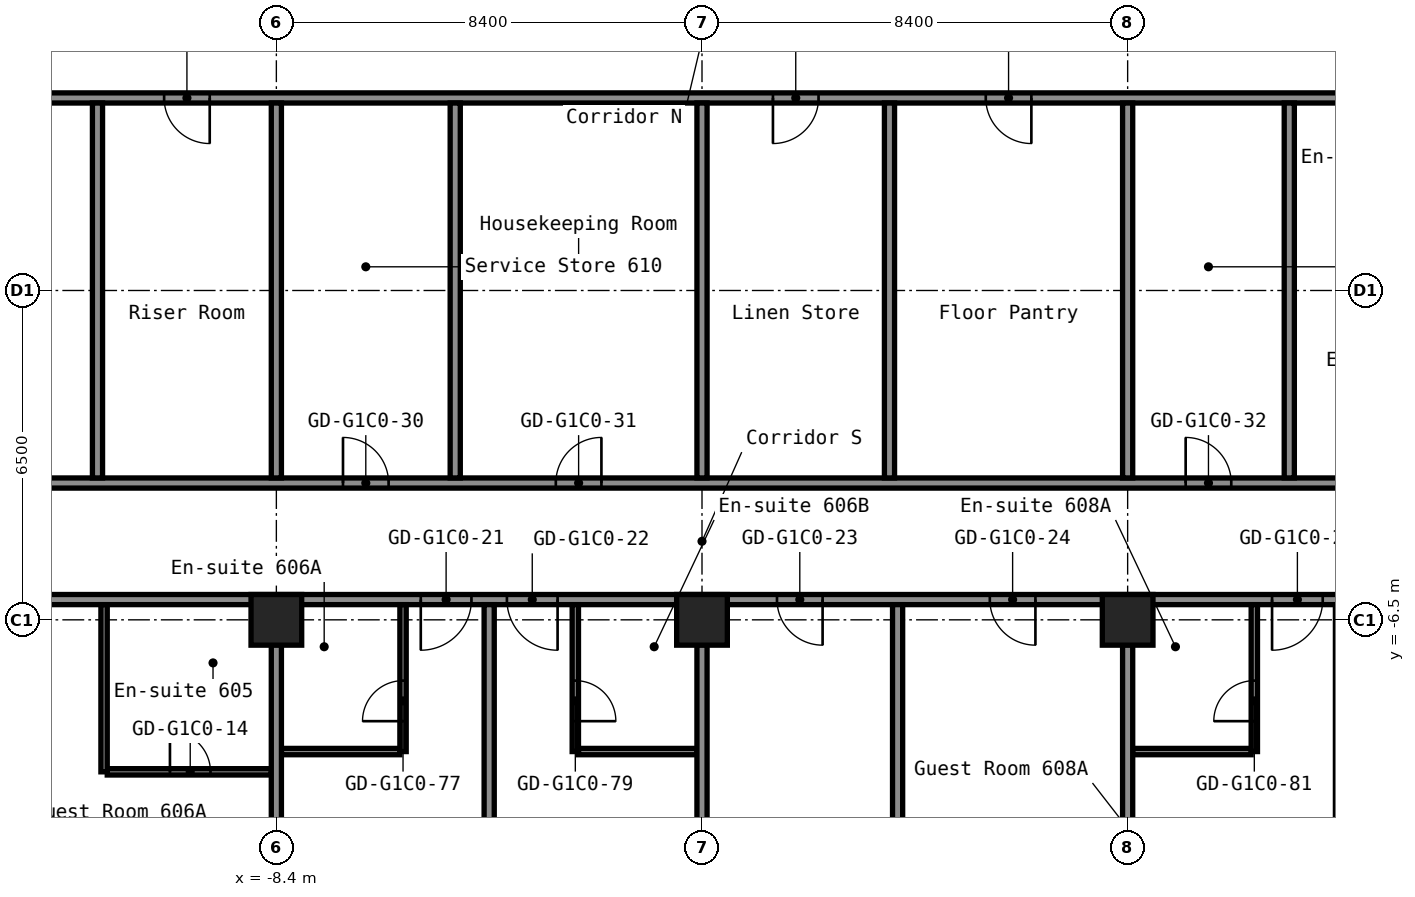
"""IFC4 building model, lengths in metres.
Left out: names, types, materials, properties, quantities, classifications, styles, units other than length and angle.
Written with IfcOpenShell. Run it as: python <this file> out.ifc"""

import sys

from ifc_helpers import new_model, si_unit, direction, frame, frame_2d, origin, origin_2d, place, context, subcontext, project, spatial, rectangle, hollow_rectangle, extrude, element, fill, save


model = new_model("IFC4")
c1 = context("Model", 3, precision=1e-05, world=origin(), true_north=direction((0.0, 1.0)))
c2 = subcontext(c1, "Body", "Model", "MODEL_VIEW")
j1 = project(units=[si_unit("LENGTHUNIT", "METRE"), si_unit("PLANEANGLEUNIT", "RADIAN")], contexts=[c1])
p1 = place(None, origin())
s1 = spatial("IfcSite", under=j1, at=p1, CompositionType="ELEMENT")
p2 = place(p1, origin())
s2 = spatial("IfcBuilding", under=s1, at=p2, CompositionType="ELEMENT")
p3 = place(p2, frame((0.0, 0.0, 26.2)))
s3 = spatial("IfcBuildingStorey", under=s2, at=p3, CompositionType="ELEMENT", Elevation=26.2)
for number, where, z_axis, x_axis in (
    (1, (-8.4, -6.5, 0.0), (0.0, 0.0, 1.0), (1.0, 0.0, 0.0)),
    (2, (0.0, -6.5, 0.0), (0.0, 0.0, 1.0), (1.0, 0.0, 0.0)),
    (3, (8.4, -6.5, 0.0), (0.0, 0.0, 1.0), (1.0, 0.0, 0.0)),
):
    element("IfcColumn", number, at=place(p3, frame(where, z_axis=z_axis, x_axis=x_axis)), inside=s3, PredefinedType="COLUMN", context=c2, shape_type="SweptSolid", body=[
        extrude(hollow_rectangle(XDim=1.0, YDim=1.0, WallThickness=0.04, at=origin_2d()), origin(), (0.0, 0.0, 1.0), 2.8),
    ])
p4 = place(p3, frame((-11.738, -9.5, 0.0), z_axis=(0.0, 0.0, 1.0), x_axis=(1.0, 0.0, 0.0)))
e4 = element("IfcWall", 4, at=p4, inside=s3, PredefinedType="PARTITIONING", context=c2, shape_type="SweptSolid", body=[
    extrude(rectangle(XDim=3.238, YDim=0.125, at=frame_2d((1.619, 0.0))), origin(), (0.0, 0.0, 1.0), 2.8),
])
p5 = place(p4, frame((1.238, 0.0, 0.0)))
e5 = element("IfcOpeningElement", 5, at=p5, cuts=e4, PredefinedType="OPENING", context=c2, shape_type="SweptSolid", body=[
    extrude(rectangle(XDim=0.8, YDim=2.1, at=frame_2d((0.4, 1.05))), frame((0.0, 0.073, 0.0), z_axis=(0.0, -1.0, 0.0), x_axis=(1.0, 0.0, 0.0)), (0.0, 0.0, 1.0), 0.145),
])
p6 = place(p3, frame((-8.3, -9.1, 0.0), z_axis=(0.0, 0.0, 1.0), x_axis=(1.0, 0.0, 0.0)))
e6 = element("IfcWall", 6, at=p6, inside=s3, PredefinedType="PARTITIONING", context=c2, shape_type="SweptSolid", body=[
    extrude(rectangle(XDim=2.338, YDim=0.125, at=frame_2d((1.169, 0.0))), origin(), (0.0, 0.0, 1.0), 2.8),
])
for number, where, z_axis, x_axis in (
    (7, (-2.438, -9.1, 0.0), (0.0, 0.0, 1.0), (1.0, 0.0, 0.0)),
    (8, (8.5, -9.1, 0.0), (0.0, 0.0, 1.0), (1.0, 0.0, 0.0)),
):
    element("IfcWall", number, at=place(p3, frame(where, z_axis=z_axis, x_axis=x_axis)), inside=s3, PredefinedType="PARTITIONING", context=c2, shape_type="SweptSolid", body=[
        extrude(rectangle(XDim=2.337, YDim=0.125, at=frame_2d((1.169, 0.0))), origin(), (0.0, 0.0, 1.0), 2.8),
    ])
p7 = place(p3, frame((-16.8, -6.1, 0.0), z_axis=(0.0, 0.0, 1.0), x_axis=(1.0, 0.0, 0.0)))
e9 = element("IfcWall", 9, at=p7, inside=s3, PredefinedType="PARTITIONING", context=c2, shape_type="SweptSolid", body=[
    extrude(rectangle(XDim=33.6, YDim=0.2, at=frame_2d((16.8, 0.0))), origin(), (0.0, 0.0, 1.0), 2.8),
])
p8 = place(p7, frame((2.0, 0.0, 0.0)))
e10 = element("IfcOpeningElement", 10, at=p8, cuts=e9, PredefinedType="OPENING", context=c2, shape_type="SweptSolid", body=[
    extrude(rectangle(XDim=1.0, YDim=2.1, at=frame_2d((0.5, 1.05))), frame((0.0, 0.11, 0.0), z_axis=(0.0, -1.0, 0.0), x_axis=(1.0, 0.0, 0.0)), (0.0, 0.0, 1.0), 0.22),
])
p9 = place(p7, frame((11.25, 0.0, 0.0)))
e11 = element("IfcOpeningElement", 11, at=p9, cuts=e9, PredefinedType="OPENING", context=c2, shape_type="SweptSolid", body=[
    extrude(rectangle(XDim=1.0, YDim=2.1, at=frame_2d((0.5, 1.05))), frame((0.0, 0.11, 0.0), z_axis=(0.0, -1.0, 0.0), x_axis=(1.0, 0.0, 0.0)), (0.0, 0.0, 1.0), 0.22),
])
p10 = place(p7, frame((12.95, 0.0, 0.0)))
e12 = element("IfcOpeningElement", 12, at=p10, cuts=e9, PredefinedType="OPENING", context=c2, shape_type="SweptSolid", body=[
    extrude(rectangle(XDim=1.0, YDim=2.1, at=frame_2d((0.5, 1.05))), frame((0.0, 0.11, 0.0), z_axis=(0.0, -1.0, 0.0), x_axis=(1.0, 0.0, 0.0)), (0.0, 0.0, 1.0), 0.22),
])
p11 = place(p7, frame((18.28, 0.0, 0.0)))
e13 = element("IfcOpeningElement", 13, at=p11, cuts=e9, PredefinedType="OPENING", context=c2, shape_type="SweptSolid", body=[
    extrude(rectangle(XDim=0.9, YDim=2.1, at=frame_2d((0.45, 1.05))), frame((0.0, 0.11, 0.0), z_axis=(0.0, -1.0, 0.0), x_axis=(1.0, 0.0, 0.0)), (0.0, 0.0, 1.0), 0.22),
])
p12 = place(p7, frame((22.48, 0.0, 0.0)))
e14 = element("IfcOpeningElement", 14, at=p12, cuts=e9, PredefinedType="OPENING", context=c2, shape_type="SweptSolid", body=[
    extrude(rectangle(XDim=0.9, YDim=2.1, at=frame_2d((0.45, 1.05))), frame((0.0, 0.11, 0.0), z_axis=(0.0, -1.0, 0.0), x_axis=(1.0, 0.0, 0.0)), (0.0, 0.0, 1.0), 0.22),
])
p13 = place(p7, frame((28.05, 0.0, 0.0)))
e15 = element("IfcOpeningElement", 15, at=p13, cuts=e9, PredefinedType="OPENING", context=c2, shape_type="SweptSolid", body=[
    extrude(rectangle(XDim=1.0, YDim=2.1, at=frame_2d((0.5, 1.05))), frame((0.0, 0.11, 0.0), z_axis=(0.0, -1.0, 0.0), x_axis=(1.0, 0.0, 0.0)), (0.0, 0.0, 1.0), 0.22),
])
p14 = place(p7, frame((29.75, 0.0, 0.0)))
e16 = element("IfcOpeningElement", 16, at=p14, cuts=e9, PredefinedType="OPENING", context=c2, shape_type="SweptSolid", body=[
    extrude(rectangle(XDim=1.0, YDim=2.1, at=frame_2d((0.5, 1.05))), frame((0.0, 0.11, 0.0), z_axis=(0.0, -1.0, 0.0), x_axis=(1.0, 0.0, 0.0)), (0.0, 0.0, 1.0), 0.22),
])
p15 = place(p3, frame((-16.8, -3.8, 0.0), z_axis=(0.0, 0.0, 1.0), x_axis=(1.0, 0.0, 0.0)))
e17 = element("IfcWall", 17, at=p15, inside=s3, PredefinedType="PARTITIONING", context=c2, shape_type="SweptSolid", body=[
    extrude(rectangle(XDim=33.6, YDim=0.2, at=frame_2d((16.8, 0.0))), origin(), (0.0, 0.0, 1.0), 2.8),
])
p16 = place(p15, frame((9.715, 0.0, 0.0)))
e18 = element("IfcOpeningElement", 18, at=p16, cuts=e17, PredefinedType="OPENING", context=c2, shape_type="SweptSolid", body=[
    extrude(rectangle(XDim=0.9, YDim=2.1, at=frame_2d((0.45, 1.05))), frame((0.0, 0.11, 0.0), z_axis=(0.0, -1.0, 0.0), x_axis=(1.0, 0.0, 0.0)), (0.0, 0.0, 1.0), 0.22),
])
p17 = place(p15, frame((13.915, 0.0, 0.0)))
e19 = element("IfcOpeningElement", 19, at=p17, cuts=e17, PredefinedType="OPENING", context=c2, shape_type="SweptSolid", body=[
    extrude(rectangle(XDim=0.9, YDim=2.1, at=frame_2d((0.45, 1.05))), frame((0.0, 0.11, 0.0), z_axis=(0.0, -1.0, 0.0), x_axis=(1.0, 0.0, 0.0)), (0.0, 0.0, 1.0), 0.22),
])
p18 = place(p15, frame((26.345, 0.0, 0.0)))
e20 = element("IfcOpeningElement", 20, at=p18, cuts=e17, PredefinedType="OPENING", context=c2, shape_type="SweptSolid", body=[
    extrude(rectangle(XDim=0.9, YDim=2.1, at=frame_2d((0.45, 1.05))), frame((0.0, 0.11, 0.0), z_axis=(0.0, -1.0, 0.0), x_axis=(1.0, 0.0, 0.0)), (0.0, 0.0, 1.0), 0.22),
])
p19 = place(p15, frame((30.545, 0.0, 0.0)))
e21 = element("IfcOpeningElement", 21, at=p19, cuts=e17, PredefinedType="OPENING", context=c2, shape_type="SweptSolid", body=[
    extrude(rectangle(XDim=0.9, YDim=2.1, at=frame_2d((0.45, 1.05))), frame((0.0, 0.11, 0.0), z_axis=(0.0, -1.0, 0.0), x_axis=(1.0, 0.0, 0.0)), (0.0, 0.0, 1.0), 0.22),
])
p20 = place(p3, frame((-16.8, 3.8, 0.0), z_axis=(0.0, 0.0, 1.0), x_axis=(1.0, 0.0, 0.0)))
e22 = element("IfcWall", 22, at=p20, inside=s3, PredefinedType="PARTITIONING", context=c2, shape_type="SweptSolid", body=[
    extrude(rectangle(XDim=33.6, YDim=0.2, at=frame_2d((16.8, 0.0))), origin(), (0.0, 0.0, 1.0), 2.8),
])
p21 = place(p20, frame((1.985, 0.0, 0.0)))
e23 = element("IfcOpeningElement", 23, at=p21, cuts=e22, PredefinedType="OPENING", context=c2, shape_type="SweptSolid", body=[
    extrude(rectangle(XDim=0.9, YDim=2.1, at=frame_2d((0.45, 1.05))), frame((0.0, 0.11, 0.0), z_axis=(0.0, -1.0, 0.0), x_axis=(1.0, 0.0, 0.0)), (0.0, 0.0, 1.0), 0.22),
])
p22 = place(p20, frame((6.185, 0.0, 0.0)))
e24 = element("IfcOpeningElement", 24, at=p22, cuts=e22, PredefinedType="OPENING", context=c2, shape_type="SweptSolid", body=[
    extrude(rectangle(XDim=0.9, YDim=2.1, at=frame_2d((0.45, 1.05))), frame((0.0, 0.11, 0.0), z_axis=(0.0, -1.0, 0.0), x_axis=(1.0, 0.0, 0.0)), (0.0, 0.0, 1.0), 0.22),
])
p23 = place(p20, frame((18.2, 0.0, 0.0)))
e25 = element("IfcOpeningElement", 25, at=p23, cuts=e22, PredefinedType="OPENING", context=c2, shape_type="SweptSolid", body=[
    extrude(rectangle(XDim=0.9, YDim=2.1, at=frame_2d((0.45, 1.05))), frame((0.0, 0.11, 0.0), z_axis=(0.0, -1.0, 0.0), x_axis=(1.0, 0.0, 0.0)), (0.0, 0.0, 1.0), 0.22),
])
p24 = place(p20, frame((22.4, 0.0, 0.0)))
e26 = element("IfcOpeningElement", 26, at=p24, cuts=e22, PredefinedType="OPENING", context=c2, shape_type="SweptSolid", body=[
    extrude(rectangle(XDim=0.9, YDim=2.1, at=frame_2d((0.45, 1.05))), frame((0.0, 0.11, 0.0), z_axis=(0.0, -1.0, 0.0), x_axis=(1.0, 0.0, 0.0)), (0.0, 0.0, 1.0), 0.22),
])
p25 = place(p3, frame((-11.93, -3.7, 0.0), z_axis=(0.0, 0.0, 1.0), x_axis=(0.0, 1.0, 0.0)))
e27 = element("IfcWall", 27, at=p25, inside=s3, PredefinedType="PARTITIONING", context=c2, shape_type="SweptSolid", body=[
    extrude(rectangle(XDim=7.4, YDim=0.2, at=frame_2d((3.7, 0.0))), origin(), (0.0, 0.0, 1.0), 2.8),
])
p26 = place(p3, frame((-11.8, -9.5, 0.0), z_axis=(0.0, 0.0, 1.0), x_axis=(0.0, 1.0, 0.0)))
e28 = element("IfcWall", 28, at=p26, inside=s3, PredefinedType="PARTITIONING", context=c2, shape_type="SweptSolid", body=[
    extrude(rectangle(XDim=3.3, YDim=0.125, at=frame_2d((1.65, 0.0))), origin(), (0.0, 0.0, 1.0), 2.8),
])
p27 = place(p3, frame((-8.4, -20.3, 0.0), z_axis=(0.0, 0.0, 1.0), x_axis=(0.0, 1.0, 0.0)))
e29 = element("IfcWall", 29, at=p27, inside=s3, PredefinedType="PARTITIONING", context=c2, shape_type="SweptSolid", body=[
    extrude(rectangle(XDim=13.31, YDim=0.2, at=frame_2d((6.655, 0.0))), origin(), (0.0, 0.0, 1.0), 2.8),
])
p28 = place(p3, frame((-8.4, -3.7, 0.0), z_axis=(0.0, 0.0, 1.0), x_axis=(0.0, 1.0, 0.0)))
e30 = element("IfcWall", 30, at=p28, inside=s3, PredefinedType="PARTITIONING", context=c2, shape_type="SweptSolid", body=[
    extrude(rectangle(XDim=7.4, YDim=0.2, at=frame_2d((3.7, 0.0))), origin(), (0.0, 0.0, 1.0), 2.8),
])
p29 = place(p3, frame((-5.9, -9.1, 0.0), z_axis=(0.0, 0.0, 1.0), x_axis=(0.0, 1.0, 0.0)))
e31 = element("IfcWall", 31, at=p29, inside=s3, PredefinedType="PARTITIONING", context=c2, shape_type="SweptSolid", body=[
    extrude(rectangle(XDim=2.9, YDim=0.125, at=frame_2d((1.45, 0.0))), origin(), (0.0, 0.0, 1.0), 2.8),
])
p30 = place(p29, frame((0.6, 0.0, 0.0)))
e32 = element("IfcOpeningElement", 32, at=p30, cuts=e31, PredefinedType="OPENING", context=c2, shape_type="SweptSolid", body=[
    extrude(rectangle(XDim=0.8, YDim=2.1, at=frame_2d((0.4, 1.05))), frame((0.0, 0.073, 0.0), z_axis=(0.0, -1.0, 0.0), x_axis=(1.0, 0.0, 0.0)), (0.0, 0.0, 1.0), 0.145),
])
p31 = place(p3, frame((-4.87, -3.7, 0.0), z_axis=(0.0, 0.0, 1.0), x_axis=(0.0, 1.0, 0.0)))
e33 = element("IfcWall", 33, at=p31, inside=s3, PredefinedType="PARTITIONING", context=c2, shape_type="SweptSolid", body=[
    extrude(rectangle(XDim=7.4, YDim=0.2, at=frame_2d((3.7, 0.0))), origin(), (0.0, 0.0, 1.0), 2.8),
])
p32 = place(p3, frame((-4.2, -20.3, 0.0), z_axis=(0.0, 0.0, 1.0), x_axis=(0.0, 1.0, 0.0)))
e34 = element("IfcWall", 34, at=p32, inside=s3, PredefinedType="PARTITIONING", context=c2, shape_type="SweptSolid", body=[
    extrude(rectangle(XDim=14.1, YDim=0.2, at=frame_2d((7.05, 0.0))), origin(), (0.0, 0.0, 1.0), 2.8),
])
p33 = place(p3, frame((-2.5, -9.1, 0.0), z_axis=(0.0, 0.0, 1.0), x_axis=(0.0, 1.0, 0.0)))
e35 = element("IfcWall", 35, at=p33, inside=s3, PredefinedType="PARTITIONING", context=c2, shape_type="SweptSolid", body=[
    extrude(rectangle(XDim=2.9, YDim=0.125, at=frame_2d((1.45, 0.0))), origin(), (0.0, 0.0, 1.0), 2.8),
])
p34 = place(p33, frame((0.6, 0.0, 0.0)))
e36 = element("IfcOpeningElement", 36, at=p34, cuts=e35, PredefinedType="OPENING", context=c2, shape_type="SweptSolid", body=[
    extrude(rectangle(XDim=0.8, YDim=2.1, at=frame_2d((0.4, 1.05))), frame((0.0, 0.073, 0.0), z_axis=(0.0, -1.0, 0.0), x_axis=(1.0, 0.0, 0.0)), (0.0, 0.0, 1.0), 0.145),
])
p35 = place(p3, frame((0.0, -20.3, 0.0), z_axis=(0.0, 0.0, 1.0), x_axis=(0.0, 1.0, 0.0)))
e37 = element("IfcWall", 37, at=p35, inside=s3, PredefinedType="PARTITIONING", context=c2, shape_type="SweptSolid", body=[
    extrude(rectangle(XDim=13.31, YDim=0.2, at=frame_2d((6.655, 0.0))), origin(), (0.0, 0.0, 1.0), 2.8),
])
for number, where, z_axis, x_axis in (
    (38, (0.0, -3.7, 0.0), (0.0, 0.0, 1.0), (0.0, 1.0, 0.0)),
    (39, (3.7, -3.7, 0.0), (0.0, 0.0, 1.0), (0.0, 1.0, 0.0)),
):
    element("IfcWall", number, at=place(p3, frame(where, z_axis=z_axis, x_axis=x_axis)), inside=s3, PredefinedType="PARTITIONING", context=c2, shape_type="SweptSolid", body=[
        extrude(rectangle(XDim=7.4, YDim=0.2, at=frame_2d((3.7, 0.0))), origin(), (0.0, 0.0, 1.0), 2.8),
    ])
p36 = place(p3, frame((3.86, -20.3, 0.0), z_axis=(0.0, 0.0, 1.0), x_axis=(0.0, 1.0, 0.0)))
e40 = element("IfcWall", 40, at=p36, inside=s3, PredefinedType="PARTITIONING", context=c2, shape_type="SweptSolid", body=[
    extrude(rectangle(XDim=14.1, YDim=0.2, at=frame_2d((7.05, 0.0))), origin(), (0.0, 0.0, 1.0), 2.8),
])
p37 = place(p3, frame((8.4, -20.3, 0.0), z_axis=(0.0, 0.0, 1.0), x_axis=(0.0, 1.0, 0.0)))
e41 = element("IfcWall", 41, at=p37, inside=s3, PredefinedType="PARTITIONING", context=c2, shape_type="SweptSolid", body=[
    extrude(rectangle(XDim=13.31, YDim=0.2, at=frame_2d((6.655, 0.0))), origin(), (0.0, 0.0, 1.0), 2.8),
])
p38 = place(p3, frame((8.4, -3.7, 0.0), z_axis=(0.0, 0.0, 1.0), x_axis=(0.0, 1.0, 0.0)))
e42 = element("IfcWall", 42, at=p38, inside=s3, PredefinedType="PARTITIONING", context=c2, shape_type="SweptSolid", body=[
    extrude(rectangle(XDim=7.4, YDim=0.2, at=frame_2d((3.7, 0.0))), origin(), (0.0, 0.0, 1.0), 2.8),
])
p39 = place(p3, frame((10.9, -9.1, 0.0), z_axis=(0.0, 0.0, 1.0), x_axis=(0.0, 1.0, 0.0)))
e43 = element("IfcWall", 43, at=p39, inside=s3, PredefinedType="PARTITIONING", context=c2, shape_type="SweptSolid", body=[
    extrude(rectangle(XDim=2.9, YDim=0.125, at=frame_2d((1.45, 0.0))), origin(), (0.0, 0.0, 1.0), 2.8),
])
p40 = place(p39, frame((0.6, 0.0, 0.0)))
e44 = element("IfcOpeningElement", 44, at=p40, cuts=e43, PredefinedType="OPENING", context=c2, shape_type="SweptSolid", body=[
    extrude(rectangle(XDim=0.8, YDim=2.1, at=frame_2d((0.4, 1.05))), frame((0.0, 0.073, 0.0), z_axis=(0.0, -1.0, 0.0), x_axis=(1.0, 0.0, 0.0)), (0.0, 0.0, 1.0), 0.145),
])
p41 = place(p3, frame((11.59, -3.7, 0.0), z_axis=(0.0, 0.0, 1.0), x_axis=(0.0, 1.0, 0.0)))
e45 = element("IfcWall", 45, at=p41, inside=s3, PredefinedType="PARTITIONING", context=c2, shape_type="SweptSolid", body=[
    extrude(rectangle(XDim=7.4, YDim=0.2, at=frame_2d((3.7, 0.0))), origin(), (0.0, 0.0, 1.0), 2.8),
])
p42 = place(p5, origin())
e46 = element("IfcDoor", 46, at=p42, inside=s3, OperationType="SINGLE_SWING_RIGHT", PredefinedType="DOOR", context=c2, shape_type="SweptSolid", body=[
    extrude(rectangle(XDim=0.8, YDim=2.1, at=frame_2d((0.4, 1.05))), frame((0.0, 0.025, 0.0), z_axis=(0.0, -1.0, 0.0), x_axis=(1.0, 0.0, 0.0)), (0.0, 0.0, 1.0), 0.05),
])
fill(e5, e46)
p43 = place(p9, origin())
e47 = element("IfcDoor", 47, at=p43, inside=s3, OperationType="SINGLE_SWING_LEFT", PredefinedType="DOOR", context=c2, shape_type="SweptSolid", body=[
    extrude(rectangle(XDim=1.0, YDim=2.1, at=frame_2d((0.5, 1.05))), frame((0.0, 0.025, 0.0), z_axis=(0.0, -1.0, 0.0), x_axis=(1.0, 0.0, 0.0)), (0.0, 0.0, 1.0), 0.05),
])
fill(e11, e47)
p44 = place(p10, origin())
e48 = element("IfcDoor", 48, at=p44, inside=s3, OperationType="SINGLE_SWING_RIGHT", PredefinedType="DOOR", context=c2, shape_type="SweptSolid", body=[
    extrude(rectangle(XDim=1.0, YDim=2.1, at=frame_2d((0.5, 1.05))), frame((0.0, 0.025, 0.0), z_axis=(0.0, -1.0, 0.0), x_axis=(1.0, 0.0, 0.0)), (0.0, 0.0, 1.0), 0.05),
])
fill(e12, e48)
p45 = place(p11, origin())
e49 = element("IfcDoor", 49, at=p45, inside=s3, OperationType="SINGLE_SWING_RIGHT", PredefinedType="DOOR", context=c2, shape_type="SweptSolid", body=[
    extrude(rectangle(XDim=0.9, YDim=2.1, at=frame_2d((0.45, 1.05))), frame((0.0, 0.025, 0.0), z_axis=(0.0, -1.0, 0.0), x_axis=(1.0, 0.0, 0.0)), (0.0, 0.0, 1.0), 0.05),
])
fill(e13, e49)
p46 = place(p12, origin())
e50 = element("IfcDoor", 50, at=p46, inside=s3, OperationType="SINGLE_SWING_RIGHT", PredefinedType="DOOR", context=c2, shape_type="SweptSolid", body=[
    extrude(rectangle(XDim=0.9, YDim=2.1, at=frame_2d((0.45, 1.05))), frame((0.0, 0.025, 0.0), z_axis=(0.0, -1.0, 0.0), x_axis=(1.0, 0.0, 0.0)), (0.0, 0.0, 1.0), 0.05),
])
fill(e14, e50)
p47 = place(p13, origin())
e51 = element("IfcDoor", 51, at=p47, inside=s3, OperationType="SINGLE_SWING_LEFT", PredefinedType="DOOR", context=c2, shape_type="SweptSolid", body=[
    extrude(rectangle(XDim=1.0, YDim=2.1, at=frame_2d((0.5, 1.05))), frame((0.0, 0.025, 0.0), z_axis=(0.0, -1.0, 0.0), x_axis=(1.0, 0.0, 0.0)), (0.0, 0.0, 1.0), 0.05),
])
fill(e15, e51)
p48 = place(p16, origin())
e52 = element("IfcDoor", 52, at=p48, inside=s3, OperationType="SINGLE_SWING_RIGHT", PredefinedType="DOOR", context=c2, shape_type="SweptSolid", body=[
    extrude(rectangle(XDim=0.9, YDim=2.1, at=frame_2d((0.45, 1.05))), frame((0.0, 0.025, 0.0), z_axis=(0.0, -1.0, 0.0), x_axis=(1.0, 0.0, 0.0)), (0.0, 0.0, 1.0), 0.05),
])
fill(e18, e52)
p49 = place(p17, origin())
e53 = element("IfcDoor", 53, at=p49, inside=s3, OperationType="SINGLE_SWING_LEFT", PredefinedType="DOOR", context=c2, shape_type="SweptSolid", body=[
    extrude(rectangle(XDim=0.9, YDim=2.1, at=frame_2d((0.45, 1.05))), frame((0.0, 0.025, 0.0), z_axis=(0.0, -1.0, 0.0), x_axis=(1.0, 0.0, 0.0)), (0.0, 0.0, 1.0), 0.05),
])
fill(e19, e53)
p50 = place(p18, origin())
e54 = element("IfcDoor", 54, at=p50, inside=s3, OperationType="SINGLE_SWING_RIGHT", PredefinedType="DOOR", context=c2, shape_type="SweptSolid", body=[
    extrude(rectangle(XDim=0.9, YDim=2.1, at=frame_2d((0.45, 1.05))), frame((0.0, 0.025, 0.0), z_axis=(0.0, -1.0, 0.0), x_axis=(1.0, 0.0, 0.0)), (0.0, 0.0, 1.0), 0.05),
])
fill(e20, e54)
p51 = place(p22, origin())
e55 = element("IfcDoor", 55, at=p51, inside=s3, OperationType="SINGLE_SWING_RIGHT", PredefinedType="DOOR", context=c2, shape_type="SweptSolid", body=[
    extrude(rectangle(XDim=0.9, YDim=2.1, at=frame_2d((0.45, 1.05))), frame((0.0, 0.025, 0.0), z_axis=(0.0, -1.0, 0.0), x_axis=(1.0, 0.0, 0.0)), (0.0, 0.0, 1.0), 0.05),
])
fill(e24, e55)
p52 = place(p23, origin())
e56 = element("IfcDoor", 56, at=p52, inside=s3, OperationType="SINGLE_SWING_LEFT", PredefinedType="DOOR", context=c2, shape_type="SweptSolid", body=[
    extrude(rectangle(XDim=0.9, YDim=2.1, at=frame_2d((0.45, 1.05))), frame((0.0, 0.025, 0.0), z_axis=(0.0, -1.0, 0.0), x_axis=(1.0, 0.0, 0.0)), (0.0, 0.0, 1.0), 0.05),
])
fill(e25, e56)
p53 = place(p24, origin())
e57 = element("IfcDoor", 57, at=p53, inside=s3, OperationType="SINGLE_SWING_RIGHT", PredefinedType="DOOR", context=c2, shape_type="SweptSolid", body=[
    extrude(rectangle(XDim=0.9, YDim=2.1, at=frame_2d((0.45, 1.05))), frame((0.0, 0.025, 0.0), z_axis=(0.0, -1.0, 0.0), x_axis=(1.0, 0.0, 0.0)), (0.0, 0.0, 1.0), 0.05),
])
fill(e26, e57)
p54 = place(p30, origin())
e58 = element("IfcDoor", 58, at=p54, inside=s3, OperationType="SINGLE_SWING_RIGHT", PredefinedType="DOOR", context=c2, shape_type="SweptSolid", body=[
    extrude(rectangle(XDim=0.8, YDim=2.1, at=frame_2d((0.4, 1.05))), frame((0.0, 0.025, 0.0), z_axis=(0.0, -1.0, 0.0), x_axis=(1.0, 0.0, 0.0)), (0.0, 0.0, 1.0), 0.05),
])
fill(e32, e58)
p55 = place(p34, origin())
e59 = element("IfcDoor", 59, at=p55, inside=s3, OperationType="SINGLE_SWING_LEFT", PredefinedType="DOOR", context=c2, shape_type="SweptSolid", body=[
    extrude(rectangle(XDim=0.8, YDim=2.1, at=frame_2d((0.4, 1.05))), frame((0.0, 0.025, 0.0), z_axis=(0.0, -1.0, 0.0), x_axis=(1.0, 0.0, 0.0)), (0.0, 0.0, 1.0), 0.05),
])
fill(e36, e59)
p56 = place(p40, origin())
e60 = element("IfcDoor", 60, at=p56, inside=s3, OperationType="SINGLE_SWING_RIGHT", PredefinedType="DOOR", context=c2, shape_type="SweptSolid", body=[
    extrude(rectangle(XDim=0.8, YDim=2.1, at=frame_2d((0.4, 1.05))), frame((0.0, 0.025, 0.0), z_axis=(0.0, -1.0, 0.0), x_axis=(1.0, 0.0, 0.0)), (0.0, 0.0, 1.0), 0.05),
])
fill(e44, e60)
save(model, sys.argv[1])
